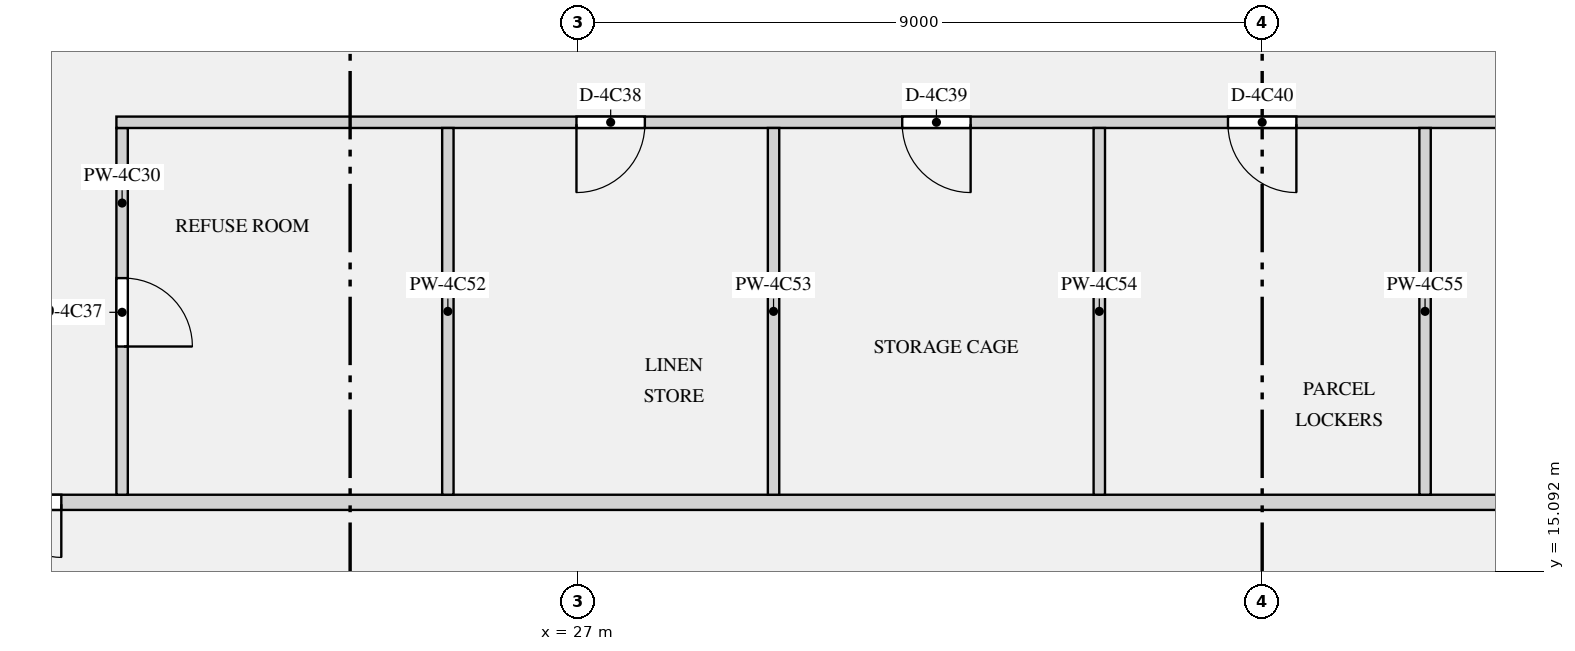
"""IFC4 building model, lengths in metres.
Left out: names, types, materials, properties, quantities, classifications, styles, units other than length and angle.
Written with IfcOpenShell. Run it as: python <this file> out.ifc"""

import sys

from ifc_helpers import new_model, si_unit, direction, frame, frame_2d, origin, place, context, subcontext, project, spatial, rectangle, extrude, element, fill, save


model = new_model("IFC4")
c1 = context("Model", 3, precision=1e-05, world=origin(), true_north=direction((0.0, 1.0)))
c2 = subcontext(c1, "Body", "Model", "MODEL_VIEW")
j1 = project(units=[si_unit("LENGTHUNIT", "METRE"), si_unit("PLANEANGLEUNIT", "RADIAN")], contexts=[c1])
p1 = place(None, origin())
s1 = spatial("IfcSite", under=j1, at=p1, CompositionType="ELEMENT")
p2 = place(p1, origin())
s2 = spatial("IfcBuilding", under=s1, at=p2, CompositionType="ELEMENT")
p3 = place(p2, frame((0.0, 0.0, 216.9)))
s3 = spatial("IfcBuildingStorey", under=s2, at=p3, CompositionType="ELEMENT", Elevation=216.9)
p4 = place(p3, frame((20.925, 21.0, 0.0), z_axis=(0.0, 0.0, 1.0), x_axis=(1.0, 0.0, 0.0)))
e1 = element("IfcWall", 1, at=p4, inside=s3, PredefinedType="PARTITIONING", context=c2, shape_type="SweptSolid", body=[
    extrude(rectangle(XDim=30.15, YDim=0.15, at=frame_2d((15.075, 0.0))), origin(), (0.0, 0.0, 1.0), 2.83),
])
p5 = place(p4, frame((6.053, 0.0, 0.0)))
e2 = element("IfcOpeningElement", 2, at=p5, cuts=e1, PredefinedType="OPENING", context=c2, shape_type="SweptSolid", body=[
    extrude(rectangle(XDim=0.9, YDim=2.1, at=frame_2d((0.45, 1.05))), frame((0.0, 0.085, 0.0), z_axis=(0.0, -1.0, 0.0), x_axis=(1.0, 0.0, 0.0)), (0.0, 0.0, 1.0), 0.17),
])
p6 = place(p4, frame((10.339, 0.0, 0.0)))
e3 = element("IfcOpeningElement", 3, at=p6, cuts=e1, PredefinedType="OPENING", context=c2, shape_type="SweptSolid", body=[
    extrude(rectangle(XDim=0.9, YDim=2.1, at=frame_2d((0.45, 1.05))), frame((0.0, 0.085, 0.0), z_axis=(0.0, -1.0, 0.0), x_axis=(1.0, 0.0, 0.0)), (0.0, 0.0, 1.0), 0.17),
])
p7 = place(p4, frame((14.625, 0.0, 0.0)))
e4 = element("IfcOpeningElement", 4, at=p7, cuts=e1, PredefinedType="OPENING", context=c2, shape_type="SweptSolid", body=[
    extrude(rectangle(XDim=0.9, YDim=2.1, at=frame_2d((0.45, 1.05))), frame((0.0, 0.085, 0.0), z_axis=(0.0, -1.0, 0.0), x_axis=(1.0, 0.0, 0.0)), (0.0, 0.0, 1.0), 0.17),
])
p8 = place(p4, frame((18.911, 0.0, 0.0)))
e5 = element("IfcOpeningElement", 5, at=p8, cuts=e1, PredefinedType="OPENING", context=c2, shape_type="SweptSolid", body=[
    extrude(rectangle(XDim=0.9, YDim=2.1, at=frame_2d((0.45, 1.05))), frame((0.0, 0.085, 0.0), z_axis=(0.0, -1.0, 0.0), x_axis=(1.0, 0.0, 0.0)), (0.0, 0.0, 1.0), 0.17),
])
p9 = place(p4, frame((23.197, 0.0, 0.0)))
e6 = element("IfcOpeningElement", 6, at=p9, cuts=e1, PredefinedType="OPENING", context=c2, shape_type="SweptSolid", body=[
    extrude(rectangle(XDim=0.9, YDim=2.1, at=frame_2d((0.45, 1.05))), frame((0.0, 0.085, 0.0), z_axis=(0.0, -1.0, 0.0), x_axis=(1.0, 0.0, 0.0)), (0.0, 0.0, 1.0), 0.17),
])
p10 = place(p3, frame((17.925, 16.0, 0.0), z_axis=(0.0, 0.0, 1.0), x_axis=(1.0, 0.0, 0.0)))
e7 = element("IfcWall", 7, at=p10, inside=s3, PredefinedType="PARTITIONING", context=c2, shape_type="SweptSolid", body=[
    extrude(rectangle(XDim=36.175, YDim=0.2, at=frame_2d((18.087, 0.0))), origin(), (0.0, 0.0, 1.0), 2.83),
])
p11 = place(p10, frame((0.875, 0.0, 0.0)))
e8 = element("IfcOpeningElement", 8, at=p11, cuts=e7, PredefinedType="OPENING", context=c2, shape_type="SweptSolid", body=[
    extrude(rectangle(XDim=1.4, YDim=2.1, at=frame_2d((0.7, 1.05))), frame((0.0, 0.11, 0.0), z_axis=(0.0, -1.0, 0.0), x_axis=(1.0, 0.0, 0.0)), (0.0, 0.0, 1.0), 0.22),
])
p12 = place(p10, frame((33.875, 0.0, 0.0)))
e9 = element("IfcOpeningElement", 9, at=p12, cuts=e7, PredefinedType="OPENING", context=c2, shape_type="SweptSolid", body=[
    extrude(rectangle(XDim=1.4, YDim=2.1, at=frame_2d((0.7, 1.05))), frame((0.0, 0.11, 0.0), z_axis=(0.0, -1.0, 0.0), x_axis=(1.0, 0.0, 0.0)), (0.0, 0.0, 1.0), 0.22),
])
p13 = place(p3, frame((21.0, 16.1, 0.0), z_axis=(0.0, 0.0, 1.0), x_axis=(0.0, 1.0, 0.0)))
e10 = element("IfcWall", 10, at=p13, inside=s3, PredefinedType="PARTITIONING", context=c2, shape_type="SweptSolid", body=[
    extrude(rectangle(XDim=4.825, YDim=0.15, at=frame_2d((2.413, 0.0))), origin(), (0.0, 0.0, 1.0), 2.83),
])
p14 = place(p13, frame((1.95, 0.0, 0.0)))
e11 = element("IfcOpeningElement", 11, at=p14, cuts=e10, PredefinedType="OPENING", context=c2, shape_type="SweptSolid", body=[
    extrude(rectangle(XDim=0.9, YDim=2.1, at=frame_2d((0.45, 1.05))), frame((0.0, 0.085, 0.0), z_axis=(0.0, -1.0, 0.0), x_axis=(1.0, 0.0, 0.0)), (0.0, 0.0, 1.0), 0.17),
])
for number, where, z_axis, x_axis in (
    (12, (25.286, 16.1, 0.0), (0.0, 0.0, 1.0), (0.0, 1.0, 0.0)),
    (13, (29.571, 16.1, 0.0), (0.0, 0.0, 1.0), (0.0, 1.0, 0.0)),
    (14, (33.857, 16.1, 0.0), (0.0, 0.0, 1.0), (0.0, 1.0, 0.0)),
    (15, (38.143, 16.1, 0.0), (0.0, 0.0, 1.0), (0.0, 1.0, 0.0)),
):
    element("IfcWall", number, at=place(p3, frame(where, z_axis=z_axis, x_axis=x_axis)), inside=s3, PredefinedType="PARTITIONING", context=c2, shape_type="SweptSolid", body=[
        extrude(rectangle(XDim=4.825, YDim=0.15, at=frame_2d((2.413, 0.0))), origin(), (0.0, 0.0, 1.0), 2.83),
    ])
p15 = place(p11, frame((1.4, 0.0, 0.0), z_axis=(0.0, 0.0, 1.0), x_axis=(-1.0, 0.0, 0.0)))
e16 = element("IfcDoor", 16, at=p15, inside=s3, OperationType="DOUBLE_DOOR_SINGLE_SWING", PredefinedType="DOOR", context=c2, shape_type="SweptSolid", body=[
    extrude(rectangle(XDim=1.4, YDim=2.1, at=frame_2d((0.7, 1.05))), frame((0.0, 0.025, 0.0), z_axis=(0.0, -1.0, 0.0), x_axis=(1.0, 0.0, 0.0)), (0.0, 0.0, 1.0), 0.05),
])
fill(e8, e16)
p16 = place(p14, frame((0.9, 0.0, 0.0), z_axis=(0.0, 0.0, 1.0), x_axis=(-1.0, 0.0, 0.0)))
e17 = element("IfcDoor", 17, at=p16, inside=s3, OperationType="SINGLE_SWING_RIGHT", PredefinedType="DOOR", context=c2, shape_type="SweptSolid", body=[
    extrude(rectangle(XDim=0.9, YDim=2.1, at=frame_2d((0.45, 1.05))), frame((0.0, 0.025, 0.0), z_axis=(0.0, -1.0, 0.0), x_axis=(1.0, 0.0, 0.0)), (0.0, 0.0, 1.0), 0.05),
])
fill(e11, e17)
p17 = place(p5, frame((0.9, 0.0, 0.0), z_axis=(0.0, 0.0, 1.0), x_axis=(-1.0, 0.0, 0.0)))
e18 = element("IfcDoor", 18, at=p17, inside=s3, OperationType="SINGLE_SWING_RIGHT", PredefinedType="DOOR", context=c2, shape_type="SweptSolid", body=[
    extrude(rectangle(XDim=0.9, YDim=2.1, at=frame_2d((0.45, 1.05))), frame((0.0, 0.025, 0.0), z_axis=(0.0, -1.0, 0.0), x_axis=(1.0, 0.0, 0.0)), (0.0, 0.0, 1.0), 0.05),
])
fill(e2, e18)
p18 = place(p6, frame((0.9, 0.0, 0.0), z_axis=(0.0, 0.0, 1.0), x_axis=(-1.0, 0.0, 0.0)))
e19 = element("IfcDoor", 19, at=p18, inside=s3, OperationType="SINGLE_SWING_LEFT", PredefinedType="DOOR", context=c2, shape_type="SweptSolid", body=[
    extrude(rectangle(XDim=0.9, YDim=2.1, at=frame_2d((0.45, 1.05))), frame((0.0, 0.025, 0.0), z_axis=(0.0, -1.0, 0.0), x_axis=(1.0, 0.0, 0.0)), (0.0, 0.0, 1.0), 0.05),
])
fill(e3, e19)
p19 = place(p7, frame((0.9, 0.0, 0.0), z_axis=(0.0, 0.0, 1.0), x_axis=(-1.0, 0.0, 0.0)))
e20 = element("IfcDoor", 20, at=p19, inside=s3, OperationType="SINGLE_SWING_LEFT", PredefinedType="DOOR", context=c2, shape_type="SweptSolid", body=[
    extrude(rectangle(XDim=0.9, YDim=2.1, at=frame_2d((0.45, 1.05))), frame((0.0, 0.025, 0.0), z_axis=(0.0, -1.0, 0.0), x_axis=(1.0, 0.0, 0.0)), (0.0, 0.0, 1.0), 0.05),
])
fill(e4, e20)
save(model, sys.argv[1])
